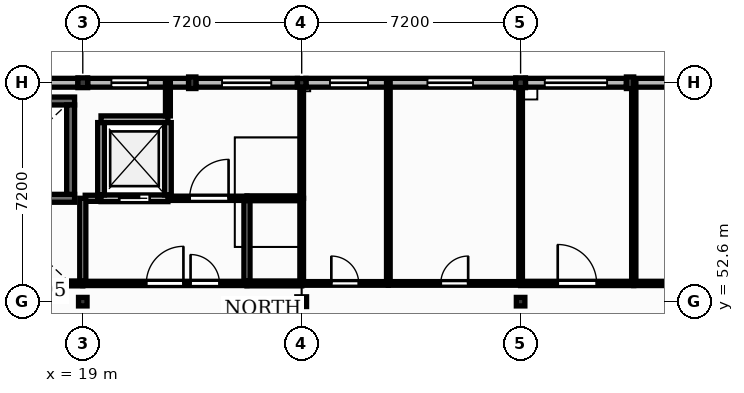
"""IFC4 building model, lengths in metres.
Left out: names, types, materials, properties, quantities, classifications, styles, units other than length and angle.
Written with IfcOpenShell. Run it as: python <this file> out.ifc"""

import sys

from ifc_helpers import new_model, si_unit, direction, frame, frame_2d, origin, origin_2d, place, context, subcontext, project, spatial, rectangle, extrude, element, fill, save


model = new_model("IFC4")
c1 = context("Model", 3, precision=1e-05, world=origin(), true_north=direction((0.0, 1.0)))
c2 = subcontext(c1, "Body", "Model", "MODEL_VIEW")
j1 = project(units=[si_unit("LENGTHUNIT", "METRE"), si_unit("PLANEANGLEUNIT", "RADIAN")], contexts=[c1])
p1 = place(None, origin())
s1 = spatial("IfcSite", under=j1, at=p1, CompositionType="ELEMENT")
p2 = place(p1, origin())
s2 = spatial("IfcBuilding", under=s1, at=p2, CompositionType="ELEMENT")
p3 = place(p2, frame((0.0, 0.0, 13.2)))
s3 = spatial("IfcBuildingStorey", under=s2, at=p3, CompositionType="ELEMENT", Elevation=13.2)
p4 = place(p3, frame((19.0, 52.6, 0.0), z_axis=(0.0, 0.0, 1.0), x_axis=(1.0, 0.0, 0.0)))
e1 = element("IfcColumn", 1, at=p4, inside=s3, PredefinedType="COLUMN", context=c2, shape_type="SweptSolid", body=[
    extrude(rectangle(XDim=0.28, YDim=0.28, at=origin_2d()), origin(), (0.0, 0.0, 1.0), 4.01),
])
for number, where, z_axis, x_axis in (
    (2, (19.0, 59.8, 0.0), (0.0, 0.0, 1.0), (1.0, 0.0, 0.0)),
    (3, (26.2, 52.6, 0.0), (0.0, 0.0, 1.0), (1.0, 0.0, 0.0)),
):
    element("IfcColumn", number, at=place(p3, frame(where, z_axis=z_axis, x_axis=x_axis)), inside=s3, PredefinedType="COLUMN", context=c2, shape_type="SweptSolid", body=[
        extrude(rectangle(XDim=0.32, YDim=0.32, at=origin_2d()), origin(), (0.0, 0.0, 1.0), 4.01),
    ])
for number, where, z_axis, x_axis in (
    (4, (26.2, 59.8, 0.0), (0.0, 0.0, 1.0), (1.0, 0.0, 0.0)),
    (5, (33.4, 52.6, 0.0), (0.0, 0.0, 1.0), (1.0, 0.0, 0.0)),
):
    element("IfcColumn", number, at=place(p3, frame(where, z_axis=z_axis, x_axis=x_axis)), inside=s3, PredefinedType="COLUMN", context=c2, shape_type="SweptSolid", body=[
        extrude(rectangle(XDim=0.28, YDim=0.28, at=origin_2d()), origin(), (0.0, 0.0, 1.0), 4.01),
    ])
p5 = place(p3, frame((33.4, 59.8, 0.0), z_axis=(0.0, 0.0, 1.0), x_axis=(1.0, 0.0, 0.0)))
e6 = element("IfcColumn", 6, at=p5, inside=s3, PredefinedType="COLUMN", context=c2, shape_type="SweptSolid", body=[
    extrude(rectangle(XDim=0.32, YDim=0.32, at=origin_2d()), origin(), (0.0, 0.0, 1.0), 4.01),
])
for number, where, z_axis, x_axis in (
    (7, (22.6, 59.8, 0.0), (0.0, 0.0, 1.0), (1.0, 0.0, 0.0)),
    (8, (37.0, 59.8, 0.0), (0.0, 0.0, 1.0), (1.0, 0.0, 0.0)),
):
    element("IfcColumn", number, at=place(p3, frame(where, z_axis=z_axis, x_axis=x_axis)), inside=s3, PredefinedType="PILASTER", context=c2, shape_type="SweptSolid", body=[
        extrude(rectangle(XDim=0.24, YDim=0.38, at=origin_2d()), origin(), (0.0, 0.0, 1.0), 4.01),
    ])
p6 = place(p3, frame((11.94, 59.8, 0.0), z_axis=(0.0, 0.0, 1.0), x_axis=(1.0, 0.0, 0.0)))
e9 = element("IfcWall", 9, at=p6, inside=s3, PredefinedType="SOLIDWALL", context=c2, shape_type="SweptSolid", body=[
    extrude(rectangle(XDim=6.9, YDim=0.29, at=frame_2d((3.45, 0.0))), origin(), (0.0, 0.0, 1.0), 3.55),
])
p7 = place(p3, frame((19.16, 59.8, 0.0), z_axis=(0.0, 0.0, 1.0), x_axis=(1.0, 0.0, 0.0)))
e10 = element("IfcWall", 10, at=p7, inside=s3, PredefinedType="SOLIDWALL", context=c2, shape_type="SweptSolid", body=[
    extrude(rectangle(XDim=3.32, YDim=0.29, at=frame_2d((1.66, 0.0))), origin(), (0.0, 0.0, 1.0), 3.55),
])
p8 = place(p7, frame((0.78, 0.0, 1.0)))
e11 = element("IfcOpeningElement", 11, at=p8, cuts=e10, PredefinedType="OPENING", context=c2, shape_type="SweptSolid", body=[
    extrude(rectangle(XDim=1.2, YDim=1.95, at=frame_2d((0.6, 0.975))), frame((0.0, 0.155, 0.0), z_axis=(0.0, -1.0, 0.0), x_axis=(1.0, 0.0, 0.0)), (0.0, 0.0, 1.0), 0.31),
])
p9 = place(p3, frame((22.72, 59.8, 0.0), z_axis=(0.0, 0.0, 1.0), x_axis=(1.0, 0.0, 0.0)))
e12 = element("IfcWall", 12, at=p9, inside=s3, PredefinedType="SOLIDWALL", context=c2, shape_type="SweptSolid", body=[
    extrude(rectangle(XDim=3.34, YDim=0.29, at=frame_2d((1.67, 0.0))), origin(), (0.0, 0.0, 1.0), 3.55),
])
p10 = place(p9, frame((0.86, 0.0, 1.0)))
e13 = element("IfcOpeningElement", 13, at=p10, cuts=e12, PredefinedType="OPENING", context=c2, shape_type="SweptSolid", body=[
    extrude(rectangle(XDim=1.62, YDim=1.95, at=frame_2d((0.81, 0.975))), frame((0.0, 0.155, 0.0), z_axis=(0.0, -1.0, 0.0), x_axis=(1.0, 0.0, 0.0)), (0.0, 0.0, 1.0), 0.31),
])
p11 = place(p3, frame((26.34, 59.8, 0.0), z_axis=(0.0, 0.0, 1.0), x_axis=(1.0, 0.0, 0.0)))
e14 = element("IfcWall", 14, at=p11, inside=s3, PredefinedType="SOLIDWALL", context=c2, shape_type="SweptSolid", body=[
    extrude(rectangle(XDim=6.9, YDim=0.29, at=frame_2d((3.45, 0.0))), origin(), (0.0, 0.0, 1.0), 3.55),
])
p12 = place(p11, frame((0.79, 0.0, 1.35)))
e15 = element("IfcOpeningElement", 15, at=p12, cuts=e14, PredefinedType="OPENING", context=c2, shape_type="SweptSolid", body=[
    extrude(rectangle(XDim=1.25, YDim=1.4, at=frame_2d((0.625, 0.7))), frame((0.0, 0.155, 0.0), z_axis=(0.0, -1.0, 0.0), x_axis=(1.0, 0.0, 0.0)), (0.0, 0.0, 1.0), 0.31),
])
p13 = place(p11, frame((3.995, 0.0, 1.5)))
e16 = element("IfcOpeningElement", 16, at=p13, cuts=e14, PredefinedType="OPENING", context=c2, shape_type="SweptSolid", body=[
    extrude(rectangle(XDim=1.5, YDim=1.25, at=frame_2d((0.75, 0.625))), frame((0.0, 0.155, 0.0), z_axis=(0.0, -1.0, 0.0), x_axis=(1.0, 0.0, 0.0)), (0.0, 0.0, 1.0), 0.31),
])
p14 = place(p3, frame((33.56, 59.8, 0.0), z_axis=(0.0, 0.0, 1.0), x_axis=(1.0, 0.0, 0.0)))
e17 = element("IfcWall", 17, at=p14, inside=s3, PredefinedType="SOLIDWALL", context=c2, shape_type="SweptSolid", body=[
    extrude(rectangle(XDim=3.32, YDim=0.29, at=frame_2d((1.66, 0.0))), origin(), (0.0, 0.0, 1.0), 3.55),
])
p15 = place(p14, frame((0.635, 0.0, 1.0)))
e18 = element("IfcOpeningElement", 18, at=p15, cuts=e17, PredefinedType="OPENING", context=c2, shape_type="SweptSolid", body=[
    extrude(rectangle(XDim=2.05, YDim=1.95, at=frame_2d((1.025, 0.975))), frame((0.0, 0.155, 0.0), z_axis=(0.0, -1.0, 0.0), x_axis=(1.0, 0.0, 0.0)), (0.0, 0.0, 1.0), 0.31),
])
p16 = place(p3, frame((37.12, 59.8, 0.0), z_axis=(0.0, 0.0, 1.0), x_axis=(1.0, 0.0, 0.0)))
e19 = element("IfcWall", 19, at=p16, inside=s3, PredefinedType="SOLIDWALL", context=c2, shape_type="SweptSolid", body=[
    extrude(rectangle(XDim=3.34, YDim=0.29, at=frame_2d((1.67, 0.0))), origin(), (0.0, 0.0, 1.0), 3.55),
])
p17 = place(p16, frame((1.12, 0.0, 1.0)))
e20 = element("IfcOpeningElement", 20, at=p17, cuts=e19, PredefinedType="OPENING", context=c2, shape_type="SweptSolid", body=[
    extrude(rectangle(XDim=1.1, YDim=1.8, at=frame_2d((0.55, 0.9))), frame((0.0, 0.155, 0.0), z_axis=(0.0, -1.0, 0.0), x_axis=(1.0, 0.0, 0.0)), (0.0, 0.0, 1.0), 0.31),
])
for number, where, z_axis, x_axis in (
    (21, (12.07, 56.0, 0.0), (0.0, 0.0, 1.0), (1.0, 0.0, 0.0)),
    (22, (12.07, 59.2, 0.0), (0.0, 0.0, 1.0), (1.0, 0.0, 0.0)),
):
    element("IfcWall", number, at=place(p3, frame(where, z_axis=z_axis, x_axis=x_axis)), inside=s3, PredefinedType="SHEAR", context=c2, shape_type="SweptSolid", body=[
        extrude(rectangle(XDim=6.66, YDim=0.26, at=frame_2d((3.33, 0.0))), origin(), (0.0, 0.0, 1.0), 3.95),
    ])
p18 = place(p3, frame((18.6, 56.13, 0.0), z_axis=(0.0, 0.0, 1.0), x_axis=(0.0, 1.0, 0.0)))
e23 = element("IfcWall", 23, at=p18, inside=s3, PredefinedType="SHEAR", context=c2, shape_type="SweptSolid", body=[
    extrude(rectangle(XDim=2.94, YDim=0.26, at=frame_2d((1.47, 0.0))), origin(), (0.0, 0.0, 1.0), 3.95),
])
p19 = place(p3, frame((19.6, 56.0, 0.0), z_axis=(0.0, 0.0, 1.0), x_axis=(1.0, 0.0, 0.0)))
e24 = element("IfcWall", 24, at=p19, inside=s3, PredefinedType="SOLIDWALL", context=c2, shape_type="SweptSolid", body=[
    extrude(rectangle(XDim=2.2, YDim=0.22, at=frame_2d((1.1, 0.0))), origin(), (0.0, 0.0, 1.0), 3.95),
])
p20 = place(p19, frame((0.6, 0.0, 0.0)))
e25 = element("IfcOpeningElement", 25, at=p20, cuts=e24, PredefinedType="OPENING", context=c2, shape_type="SweptSolid", body=[
    extrude(rectangle(XDim=1.0, YDim=2.15, at=frame_2d((0.5, 1.075))), frame((0.0, 0.12, 0.0), z_axis=(0.0, -1.0, 0.0), x_axis=(1.0, 0.0, 0.0)), (0.0, 0.0, 1.0), 0.24),
])
p21 = place(p3, frame((19.6, 58.6, 0.0), z_axis=(0.0, 0.0, 1.0), x_axis=(1.0, 0.0, 0.0)))
e26 = element("IfcWall", 26, at=p21, inside=s3, PredefinedType="SOLIDWALL", context=c2, shape_type="SweptSolid", body=[
    extrude(rectangle(XDim=2.2, YDim=0.22, at=frame_2d((1.1, 0.0))), origin(), (0.0, 0.0, 1.0), 3.95),
])
for number, where, z_axis, x_axis in (
    (27, (19.6, 56.11, 0.0), (0.0, 0.0, 1.0), (0.0, 1.0, 0.0)),
    (28, (21.8, 56.11, 0.0), (0.0, 0.0, 1.0), (0.0, 1.0, 0.0)),
):
    element("IfcWall", number, at=place(p3, frame(where, z_axis=z_axis, x_axis=x_axis)), inside=s3, PredefinedType="SOLIDWALL", context=c2, shape_type="SweptSolid", body=[
        extrude(rectangle(XDim=2.38, YDim=0.22, at=frame_2d((1.19, 0.0))), origin(), (0.0, 0.0, 1.0), 3.95),
    ])
p22 = place(p3, frame((19.0, 53.2, 0.0), z_axis=(0.0, 0.0, 1.0), x_axis=(1.0, 0.0, 0.0)))
e29 = element("IfcWall", 29, at=p22, inside=s3, PredefinedType="PARTITIONING", context=c2, shape_type="SweptSolid", body=[
    extrude(rectangle(XDim=5.4, YDim=0.14, at=frame_2d((2.7, 0.0))), origin(), (0.0, 0.0, 1.0), 3.96),
])
p23 = place(p22, frame((2.09, 0.0, 0.0)))
e30 = element("IfcOpeningElement", 30, at=p23, cuts=e29, PredefinedType="OPENING", context=c2, shape_type="SweptSolid", body=[
    extrude(rectangle(XDim=1.22, YDim=2.1, at=frame_2d((0.61, 1.05))), frame((0.0, 0.08, 0.0), z_axis=(0.0, -1.0, 0.0), x_axis=(1.0, 0.0, 0.0)), (0.0, 0.0, 1.0), 0.16),
])
p24 = place(p22, frame((3.545, 0.0, 0.0)))
e31 = element("IfcOpeningElement", 31, at=p24, cuts=e29, PredefinedType="OPENING", context=c2, shape_type="SweptSolid", body=[
    extrude(rectangle(XDim=0.95, YDim=2.1, at=frame_2d((0.475, 1.05))), frame((0.0, 0.08, 0.0), z_axis=(0.0, -1.0, 0.0), x_axis=(1.0, 0.0, 0.0)), (0.0, 0.0, 1.0), 0.16),
])
p25 = place(p3, frame((21.91, 56.0, 0.0), z_axis=(0.0, 0.0, 1.0), x_axis=(1.0, 0.0, 0.0)))
e32 = element("IfcWall", 32, at=p25, inside=s3, PredefinedType="PARTITIONING", context=c2, shape_type="SweptSolid", body=[
    extrude(rectangle(XDim=2.49, YDim=0.14, at=frame_2d((1.245, 0.0))), origin(), (0.0, 0.0, 1.0), 3.96),
])
p26 = place(p25, frame((0.605, 0.0, 0.0)))
e33 = element("IfcOpeningElement", 33, at=p26, cuts=e32, PredefinedType="OPENING", context=c2, shape_type="SweptSolid", body=[
    extrude(rectangle(XDim=1.28, YDim=2.2, at=frame_2d((0.64, 1.1))), frame((0.0, 0.08, 0.0), z_axis=(0.0, -1.0, 0.0), x_axis=(1.0, 0.0, 0.0)), (0.0, 0.0, 1.0), 0.16),
])
p27 = place(p3, frame((26.2, 53.2, 0.0), z_axis=(0.0, 0.0, 1.0), x_axis=(1.0, 0.0, 0.0)))
e34 = element("IfcWall", 34, at=p27, inside=s3, PredefinedType="PLUMBINGWALL", context=c2, shape_type="SweptSolid", body=[
    extrude(rectangle(XDim=2.85, YDim=0.12, at=frame_2d((1.425, 0.0))), origin(), (0.0, 0.0, 1.0), 3.96),
])
p28 = place(p27, frame((0.975, 0.0, 0.0)))
e35 = element("IfcOpeningElement", 35, at=p28, cuts=e34, PredefinedType="OPENING", context=c2, shape_type="SweptSolid", body=[
    extrude(rectangle(XDim=0.9, YDim=2.1, at=frame_2d((0.45, 1.05))), frame((0.0, 0.07, 0.0), z_axis=(0.0, -1.0, 0.0), x_axis=(1.0, 0.0, 0.0)), (0.0, 0.0, 1.0), 0.14),
])
p29 = place(p3, frame((26.2, 56.0, 0.0), z_axis=(0.0, 0.0, 1.0), x_axis=(0.0, 1.0, 0.0)))
e36 = element("IfcWall", 36, at=p29, inside=s3, PredefinedType="PLUMBINGWALL", context=c2, shape_type="SweptSolid", body=[
    extrude(rectangle(XDim=3.66, YDim=0.12, at=frame_2d((1.83, 0.0))), origin(), (0.0, 0.0, 1.0), 3.49),
])
p30 = place(p3, frame((29.05, 53.27, 0.0), z_axis=(0.0, 0.0, 1.0), x_axis=(0.0, 1.0, 0.0)))
e37 = element("IfcWall", 37, at=p30, inside=s3, PredefinedType="PLUMBINGWALL", context=c2, shape_type="SweptSolid", body=[
    extrude(rectangle(XDim=6.53, YDim=0.12, at=frame_2d((3.265, 0.0))), origin(), (0.0, 0.0, 1.0), 3.96),
])
p31 = place(p3, frame((29.05, 53.2, 0.0), z_axis=(0.0, 0.0, 1.0), x_axis=(1.0, 0.0, 0.0)))
e38 = element("IfcWall", 38, at=p31, inside=s3, PredefinedType="PLUMBINGWALL", context=c2, shape_type="SweptSolid", body=[
    extrude(rectangle(XDim=4.35, YDim=0.12, at=frame_2d((2.175, 0.0))), origin(), (0.0, 0.0, 1.0), 3.96),
])
p32 = place(p31, frame((1.725, 0.0, 0.0)))
e39 = element("IfcOpeningElement", 39, at=p32, cuts=e38, PredefinedType="OPENING", context=c2, shape_type="SweptSolid", body=[
    extrude(rectangle(XDim=0.9, YDim=2.1, at=frame_2d((0.45, 1.05))), frame((0.0, 0.07, 0.0), z_axis=(0.0, -1.0, 0.0), x_axis=(1.0, 0.0, 0.0)), (0.0, 0.0, 1.0), 0.14),
])
p33 = place(p3, frame((33.4, 53.27, 0.0), z_axis=(0.0, 0.0, 1.0), x_axis=(0.0, 1.0, 0.0)))
e40 = element("IfcWall", 40, at=p33, inside=s3, PredefinedType="PLUMBINGWALL", context=c2, shape_type="SweptSolid", body=[
    extrude(rectangle(XDim=6.37, YDim=0.12, at=frame_2d((3.185, 0.0))), origin(), (0.0, 0.0, 1.0), 3.49),
])
p34 = place(p3, frame((33.4, 53.2, 0.0), z_axis=(0.0, 0.0, 1.0), x_axis=(1.0, 0.0, 0.0)))
e41 = element("IfcWall", 41, at=p34, inside=s3, PredefinedType="PARTITIONING", context=c2, shape_type="SweptSolid", body=[
    extrude(rectangle(XDim=3.722, YDim=0.14, at=frame_2d((1.861, 0.0))), origin(), (0.0, 0.0, 1.0), 3.96),
])
p35 = place(p34, frame((1.221, 0.0, 0.0)))
e42 = element("IfcOpeningElement", 42, at=p35, cuts=e41, PredefinedType="OPENING", context=c2, shape_type="SweptSolid", body=[
    extrude(rectangle(XDim=1.28, YDim=2.2, at=frame_2d((0.64, 1.1))), frame((0.0, 0.08, 0.0), z_axis=(0.0, -1.0, 0.0), x_axis=(1.0, 0.0, 0.0)), (0.0, 0.0, 1.0), 0.16),
])
p36 = place(p3, frame((37.122, 53.27, 0.0), z_axis=(0.0, 0.0, 1.0), x_axis=(0.0, 1.0, 0.0)))
e43 = element("IfcWall", 43, at=p36, inside=s3, PredefinedType="PARTITIONING", context=c2, shape_type="SweptSolid", body=[
    extrude(rectangle(XDim=6.53, YDim=0.14, at=frame_2d((3.265, 0.0))), origin(), (0.0, 0.0, 1.0), 3.96),
])
p37 = place(p3, frame((37.122, 53.2, 0.0), z_axis=(0.0, 0.0, 1.0), x_axis=(1.0, 0.0, 0.0)))
e44 = element("IfcWall", 44, at=p37, inside=s3, PredefinedType="PARTITIONING", context=c2, shape_type="SweptSolid", body=[
    extrude(rectangle(XDim=3.478, YDim=0.14, at=frame_2d((1.739, 0.0))), origin(), (0.0, 0.0, 1.0), 3.96),
])
p38 = place(p37, frame((1.249, 0.0, 0.0)))
e45 = element("IfcOpeningElement", 45, at=p38, cuts=e44, PredefinedType="OPENING", context=c2, shape_type="SweptSolid", body=[
    extrude(rectangle(XDim=0.98, YDim=2.15, at=frame_2d((0.49, 1.075))), frame((0.0, 0.08, 0.0), z_axis=(0.0, -1.0, 0.0), x_axis=(1.0, 0.0, 0.0)), (0.0, 0.0, 1.0), 0.16),
])
p39 = place(p3, frame((24.4, 53.27, 0.0), z_axis=(0.0, 0.0, 1.0), x_axis=(0.0, 1.0, 0.0)))
e46 = element("IfcWall", 46, at=p39, inside=s3, PredefinedType="PARTITIONING", context=c2, shape_type="SweptSolid", body=[
    extrude(rectangle(XDim=2.66, YDim=0.2, at=frame_2d((1.33, 0.0))), origin(), (0.0, 0.0, 1.0), 3.96),
])
p40 = place(p3, frame((19.49, 56.0, 0.0), z_axis=(0.0, 0.0, 1.0), x_axis=(-1.0, 0.0, 0.0)))
e47 = element("IfcWall", 47, at=p40, inside=s3, PredefinedType="PARTITIONING", context=c2, shape_type="SweptSolid", body=[
    extrude(rectangle(XDim=0.41, YDim=0.2, at=frame_2d((0.205, 0.0))), origin(), (0.0, 0.0, 1.0), 3.96),
])
p41 = place(p3, frame((19.0, 53.27, 0.0), z_axis=(0.0, 0.0, 1.0), x_axis=(0.0, 1.0, 0.0)))
e48 = element("IfcWall", 48, at=p41, inside=s3, PredefinedType="PARTITIONING", context=c2, shape_type="SweptSolid", body=[
    extrude(rectangle(XDim=2.73, YDim=0.2, at=frame_2d((1.365, 0.0))), origin(), (0.0, 0.0, 1.0), 3.49),
])
p42 = place(p3, frame((26.2, 53.2, 0.0), z_axis=(0.0, 0.0, 1.0), x_axis=(-1.0, 0.0, 0.0)))
e49 = element("IfcWall", 49, at=p42, inside=s3, PredefinedType="PARTITIONING", context=c2, shape_type="SweptSolid", body=[
    extrude(rectangle(XDim=1.8, YDim=0.16, at=frame_2d((0.9, 0.0))), origin(), (0.0, 0.0, 1.0), 3.96),
])
p43 = place(p3, frame((19.0, 53.2, 0.0), z_axis=(0.0, 0.0, 1.0), x_axis=(-1.0, 0.0, 0.0)))
e50 = element("IfcWall", 50, at=p43, inside=s3, PredefinedType="PARTITIONING", context=c2, shape_type="SweptSolid", body=[
    extrude(rectangle(XDim=2.8, YDim=0.16, at=frame_2d((1.4, 0.0))), origin(), (0.0, 0.0, 1.0), 3.96),
])
p44 = place(p3, frame((26.2, 53.27, 0.0), z_axis=(0.0, 0.0, 1.0), x_axis=(0.0, 1.0, 0.0)))
e51 = element("IfcWall", 51, at=p44, inside=s3, PredefinedType="PLUMBINGWALL", context=c2, shape_type="SweptSolid", body=[
    extrude(rectangle(XDim=2.73, YDim=0.12, at=frame_2d((1.365, 0.0))), origin(), (0.0, 0.0, 1.0), 3.49),
])
p45 = place(p3, frame((24.4, 56.0, 0.0), z_axis=(0.0, 0.0, 1.0), x_axis=(1.0, 0.0, 0.0)))
e52 = element("IfcWall", 52, at=p45, inside=s3, PredefinedType="PARTITIONING", context=c2, shape_type="SweptSolid", body=[
    extrude(rectangle(XDim=1.8, YDim=0.16, at=frame_2d((0.9, 0.0))), origin(), (0.0, 0.0, 1.0), 3.96),
])
p46 = place(p3, frame((21.8, 58.71, 0.0), z_axis=(0.0, 0.0, 1.0), x_axis=(0.0, 1.0, 0.0)))
e53 = element("IfcWall", 53, at=p46, inside=s3, PredefinedType="PARTITIONING", context=c2, shape_type="SweptSolid", body=[
    extrude(rectangle(XDim=1.09, YDim=0.16, at=frame_2d((0.545, 0.0))), origin(), (0.0, 0.0, 1.0), 3.96),
])
p47 = place(p8, origin())
e54 = element("IfcWindow", 54, at=p47, inside=s3, PartitioningType="SINGLE_PANEL", PredefinedType="WINDOW", context=c2, shape_type="SweptSolid", body=[
    extrude(rectangle(XDim=1.2, YDim=1.95, at=frame_2d((0.6, 0.975))), frame((0.0, 0.03, 0.0), z_axis=(0.0, -1.0, 0.0), x_axis=(1.0, 0.0, 0.0)), (0.0, 0.0, 1.0), 0.06),
])
fill(e11, e54)
p48 = place(p10, origin())
e55 = element("IfcWindow", 55, at=p48, inside=s3, PartitioningType="DOUBLE_PANEL_VERTICAL", PredefinedType="WINDOW", context=c2, shape_type="SweptSolid", body=[
    extrude(rectangle(XDim=1.62, YDim=1.95, at=frame_2d((0.81, 0.975))), frame((0.0, 0.03, 0.0), z_axis=(0.0, -1.0, 0.0), x_axis=(1.0, 0.0, 0.0)), (0.0, 0.0, 1.0), 0.06),
])
fill(e13, e55)
p49 = place(p12, origin())
e56 = element("IfcWindow", 56, at=p49, inside=s3, PartitioningType="SINGLE_PANEL", PredefinedType="WINDOW", context=c2, shape_type="SweptSolid", body=[
    extrude(rectangle(XDim=1.25, YDim=1.4, at=frame_2d((0.625, 0.7))), frame((0.0, 0.03, 0.0), z_axis=(0.0, -1.0, 0.0), x_axis=(1.0, 0.0, 0.0)), (0.0, 0.0, 1.0), 0.06),
])
fill(e15, e56)
p50 = place(p13, origin())
e57 = element("IfcWindow", 57, at=p50, inside=s3, PartitioningType="DOUBLE_PANEL_VERTICAL", PredefinedType="WINDOW", context=c2, shape_type="SweptSolid", body=[
    extrude(rectangle(XDim=1.5, YDim=1.25, at=frame_2d((0.75, 0.625))), frame((0.0, 0.03, 0.0), z_axis=(0.0, -1.0, 0.0), x_axis=(1.0, 0.0, 0.0)), (0.0, 0.0, 1.0), 0.06),
])
fill(e16, e57)
p51 = place(p15, origin())
e58 = element("IfcWindow", 58, at=p51, inside=s3, PartitioningType="DOUBLE_PANEL_VERTICAL", PredefinedType="WINDOW", context=c2, shape_type="SweptSolid", body=[
    extrude(rectangle(XDim=2.05, YDim=1.95, at=frame_2d((1.025, 0.975))), frame((0.0, 0.03, 0.0), z_axis=(0.0, -1.0, 0.0), x_axis=(1.0, 0.0, 0.0)), (0.0, 0.0, 1.0), 0.06),
])
fill(e18, e58)
p52 = place(p20, origin())
e59 = element("IfcDoor", 59, at=p52, inside=s3, OperationType="SLIDING_TO_LEFT", PredefinedType="DOOR", context=c2, shape_type="SweptSolid", body=[
    extrude(rectangle(XDim=1.0, YDim=2.15, at=frame_2d((0.5, 1.075))), frame((0.0, 0.025, 0.0), z_axis=(0.0, -1.0, 0.0), x_axis=(1.0, 0.0, 0.0)), (0.0, 0.0, 1.0), 0.05),
])
fill(e25, e59)
p53 = place(p23, origin())
e60 = element("IfcDoor", 60, at=p53, inside=s3, OperationType="SINGLE_SWING_RIGHT", PredefinedType="DOOR", context=c2, shape_type="SweptSolid", body=[
    extrude(rectangle(XDim=1.22, YDim=2.1, at=frame_2d((0.61, 1.05))), frame((0.0, 0.025, 0.0), z_axis=(0.0, -1.0, 0.0), x_axis=(1.0, 0.0, 0.0)), (0.0, 0.0, 1.0), 0.05),
])
fill(e30, e60)
p54 = place(p24, origin())
e61 = element("IfcDoor", 61, at=p54, inside=s3, OperationType="SINGLE_SWING_LEFT", PredefinedType="DOOR", context=c2, shape_type="SweptSolid", body=[
    extrude(rectangle(XDim=0.95, YDim=2.1, at=frame_2d((0.475, 1.05))), frame((0.0, 0.025, 0.0), z_axis=(0.0, -1.0, 0.0), x_axis=(1.0, 0.0, 0.0)), (0.0, 0.0, 1.0), 0.05),
])
fill(e31, e61)
p55 = place(p28, origin())
e62 = element("IfcDoor", 62, at=p55, inside=s3, OperationType="SINGLE_SWING_LEFT", PredefinedType="DOOR", context=c2, shape_type="SweptSolid", body=[
    extrude(rectangle(XDim=0.9, YDim=2.1, at=frame_2d((0.45, 1.05))), frame((0.0, 0.025, 0.0), z_axis=(0.0, -1.0, 0.0), x_axis=(1.0, 0.0, 0.0)), (0.0, 0.0, 1.0), 0.05),
])
fill(e35, e62)
p56 = place(p32, origin())
e63 = element("IfcDoor", 63, at=p56, inside=s3, OperationType="SINGLE_SWING_RIGHT", PredefinedType="DOOR", context=c2, shape_type="SweptSolid", body=[
    extrude(rectangle(XDim=0.9, YDim=2.1, at=frame_2d((0.45, 1.05))), frame((0.0, 0.025, 0.0), z_axis=(0.0, -1.0, 0.0), x_axis=(1.0, 0.0, 0.0)), (0.0, 0.0, 1.0), 0.05),
])
fill(e39, e63)
p57 = place(p26, origin())
e64 = element("IfcDoor", 64, at=p57, inside=s3, OperationType="SINGLE_SWING_RIGHT", PredefinedType="DOOR", context=c2, shape_type="SweptSolid", body=[
    extrude(rectangle(XDim=1.28, YDim=2.2, at=frame_2d((0.64, 1.1))), frame((0.0, 0.025, 0.0), z_axis=(0.0, -1.0, 0.0), x_axis=(1.0, 0.0, 0.0)), (0.0, 0.0, 1.0), 0.05),
])
fill(e33, e64)
p58 = place(p35, origin())
e65 = element("IfcDoor", 65, at=p58, inside=s3, OperationType="SINGLE_SWING_LEFT", PredefinedType="DOOR", context=c2, shape_type="SweptSolid", body=[
    extrude(rectangle(XDim=1.28, YDim=2.2, at=frame_2d((0.64, 1.1))), frame((0.0, 0.025, 0.0), z_axis=(0.0, -1.0, 0.0), x_axis=(1.0, 0.0, 0.0)), (0.0, 0.0, 1.0), 0.05),
])
fill(e42, e65)
save(model, sys.argv[1])
